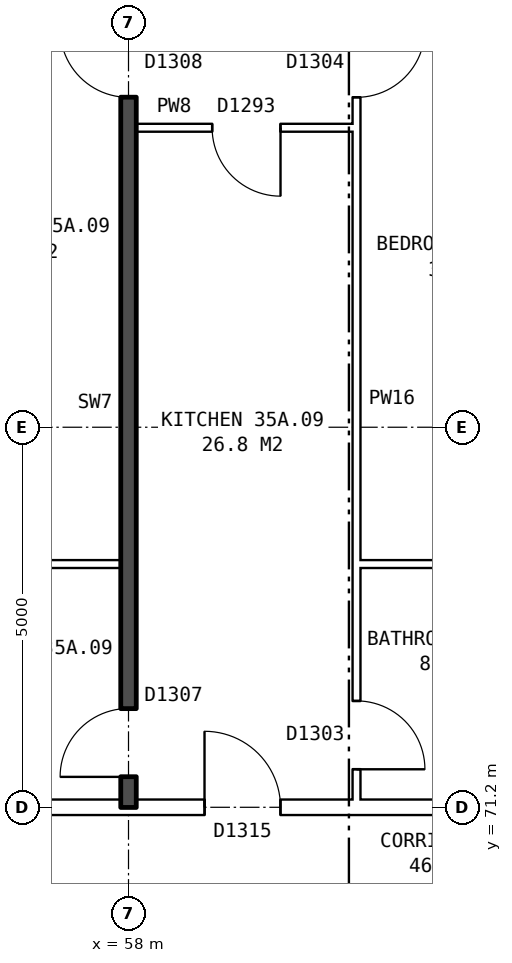
"""IFC4 building model, lengths in metres.
Left out: names, types, materials, properties, quantities, classifications, styles, units other than length and angle.
Written with IfcOpenShell. Run it as: python <this file> out.ifc"""

import sys

from ifc_helpers import new_model, si_unit, direction, frame, frame_2d, origin, place, context, subcontext, project, spatial, rectangle, extrude, element, fill, save


model = new_model("IFC4")
c1 = context("Model", 3, precision=1e-05, world=origin(), true_north=direction((0.0, 1.0)))
c2 = subcontext(c1, "Body", "Model", "MODEL_VIEW")
j1 = project(units=[si_unit("LENGTHUNIT", "METRE"), si_unit("PLANEANGLEUNIT", "RADIAN")], contexts=[c1])
p1 = place(None, origin())
s1 = spatial("IfcSite", under=j1, at=p1, CompositionType="ELEMENT")
p2 = place(p1, origin())
s2 = spatial("IfcBuilding", under=s1, at=p2, CompositionType="ELEMENT")
p3 = place(p2, frame((0.0, 0.0, 126.8)))
s3 = spatial("IfcBuildingStorey", under=s2, at=p3, CompositionType="ELEMENT", Elevation=126.8)
p4 = place(p3, frame((44.36, 71.2, 0.0), z_axis=(0.0, 0.0, 1.0), x_axis=(1.0, 0.0, 0.0)))
e1 = element("IfcWall", 1, at=p4, inside=s3, PredefinedType="PARTITIONING", context=c2, shape_type="SweptSolid", body=[
    extrude(rectangle(XDim=19.28, YDim=0.2, at=frame_2d((9.64, 0.0))), origin(), (0.0, 0.0, 1.0), 2.85),
])
p5 = place(p4, frame((14.64, 0.0, 0.0)))
e2 = element("IfcOpeningElement", 2, at=p5, cuts=e1, PredefinedType="OPENING", context=c2, shape_type="SweptSolid", body=[
    extrude(rectangle(XDim=1.0, YDim=2.1, at=frame_2d((0.5, 1.05))), frame((0.0, 0.11, 0.0), z_axis=(0.0, -1.0, 0.0), x_axis=(1.0, 0.0, 0.0)), (0.0, 0.0, 1.0), 0.22),
])
p6 = place(p4, frame((5.64, 0.0, 0.0)))
e3 = element("IfcOpeningElement", 3, at=p6, cuts=e1, PredefinedType="OPENING", context=c2, shape_type="SweptSolid", body=[
    extrude(rectangle(XDim=1.0, YDim=2.1, at=frame_2d((0.5, 1.05))), frame((0.0, 0.11, 0.0), z_axis=(0.0, -1.0, 0.0), x_axis=(1.0, 0.0, 0.0)), (0.0, 0.0, 1.0), 0.22),
])
p7 = place(p3, frame((55.1, 74.4, 0.0), z_axis=(0.0, 0.0, 1.0), x_axis=(1.0, 0.0, 0.0)))
e4 = element("IfcWall", 4, at=p7, inside=s3, PredefinedType="PARTITIONING", context=c2, shape_type="SweptSolid", body=[
    extrude(rectangle(XDim=2.8, YDim=0.1, at=frame_2d((1.4, 0.0))), origin(), (0.0, 0.0, 1.0), 2.85),
])
p8 = place(p3, frame((61.0, 74.4, 0.0), z_axis=(0.0, 0.0, 1.0), x_axis=(1.0, 0.0, 0.0)))
e5 = element("IfcWall", 5, at=p8, inside=s3, PredefinedType="PARTITIONING", context=c2, shape_type="SweptSolid", body=[
    extrude(rectangle(XDim=2.64, YDim=0.1, at=frame_2d((1.32, 0.0))), origin(), (0.0, 0.0, 1.0), 2.85),
])
p9 = place(p3, frame((58.1, 80.14, 0.0), z_axis=(0.0, 0.0, 1.0), x_axis=(1.0, 0.0, 0.0)))
e6 = element("IfcWall", 6, at=p9, inside=s3, PredefinedType="PARTITIONING", context=c2, shape_type="SweptSolid", body=[
    extrude(rectangle(XDim=2.9, YDim=0.1, at=frame_2d((1.45, 0.0))), origin(), (0.0, 0.0, 1.0), 2.85),
])
p10 = place(p9, frame((1.0, 0.0, 0.0)))
e7 = element("IfcOpeningElement", 7, at=p10, cuts=e6, PredefinedType="OPENING", context=c2, shape_type="SweptSolid", body=[
    extrude(rectangle(XDim=0.9, YDim=2.1, at=frame_2d((0.45, 1.05))), frame((0.0, 0.06, 0.0), z_axis=(0.0, -1.0, 0.0), x_axis=(1.0, 0.0, 0.0)), (0.0, 0.0, 1.0), 0.12),
])
p11 = place(p3, frame((58.0, 71.2, 0.0), z_axis=(0.0, 0.0, 1.0), x_axis=(0.0, 1.0, 0.0)))
e8 = element("IfcWall", 8, at=p11, inside=s3, PredefinedType="SOLIDWALL", context=c2, shape_type="SweptSolid", body=[
    extrude(rectangle(XDim=14.44, YDim=0.2, at=frame_2d((7.22, 0.0))), origin(), (0.0, 0.0, 1.0), 2.85),
])
p12 = place(p11, frame((9.34, 0.0, 0.0)))
e9 = element("IfcOpeningElement", 9, at=p12, cuts=e8, PredefinedType="OPENING", context=c2, shape_type="SweptSolid", body=[
    extrude(rectangle(XDim=0.9, YDim=2.1, at=frame_2d((0.45, 1.05))), frame((0.0, 0.11, 0.0), z_axis=(0.0, -1.0, 0.0), x_axis=(1.0, 0.0, 0.0)), (0.0, 0.0, 1.0), 0.22),
])
p13 = place(p11, frame((0.4, 0.0, 0.0)))
e10 = element("IfcOpeningElement", 10, at=p13, cuts=e8, PredefinedType="OPENING", context=c2, shape_type="SweptSolid", body=[
    extrude(rectangle(XDim=0.9, YDim=2.1, at=frame_2d((0.45, 1.05))), frame((0.0, 0.11, 0.0), z_axis=(0.0, -1.0, 0.0), x_axis=(1.0, 0.0, 0.0)), (0.0, 0.0, 1.0), 0.22),
])
p14 = place(p3, frame((61.0, 71.3, 0.0), z_axis=(0.0, 0.0, 1.0), x_axis=(0.0, 1.0, 0.0)))
e11 = element("IfcWall", 11, at=p14, inside=s3, PredefinedType="PARTITIONING", context=c2, shape_type="SweptSolid", body=[
    extrude(rectangle(XDim=14.34, YDim=0.1, at=frame_2d((7.17, 0.0))), origin(), (0.0, 0.0, 1.0), 2.85),
])
p15 = place(p14, frame((9.24, 0.0, 0.0)))
e12 = element("IfcOpeningElement", 12, at=p15, cuts=e11, PredefinedType="OPENING", context=c2, shape_type="SweptSolid", body=[
    extrude(rectangle(XDim=0.9, YDim=2.1, at=frame_2d((0.45, 1.05))), frame((0.0, 0.06, 0.0), z_axis=(0.0, -1.0, 0.0), x_axis=(1.0, 0.0, 0.0)), (0.0, 0.0, 1.0), 0.12),
])
p16 = place(p14, frame((0.4, 0.0, 0.0)))
e13 = element("IfcOpeningElement", 13, at=p16, cuts=e11, PredefinedType="OPENING", context=c2, shape_type="SweptSolid", body=[
    extrude(rectangle(XDim=0.9, YDim=2.1, at=frame_2d((0.45, 1.05))), frame((0.0, 0.06, 0.0), z_axis=(0.0, -1.0, 0.0), x_axis=(1.0, 0.0, 0.0)), (0.0, 0.0, 1.0), 0.12),
])
p17 = place(p15, frame((0.9, 0.0, 0.0), z_axis=(0.0, 0.0, 1.0), x_axis=(-1.0, 0.0, 0.0)))
e14 = element("IfcDoor", 14, at=p17, inside=s3, OperationType="SINGLE_SWING_LEFT", PredefinedType="DOOR", context=c2, shape_type="SweptSolid", body=[
    extrude(rectangle(XDim=0.9, YDim=2.1, at=frame_2d((0.45, 1.05))), frame((0.0, 0.025, 0.0), z_axis=(0.0, -1.0, 0.0), x_axis=(1.0, 0.0, 0.0)), (0.0, 0.0, 1.0), 0.05),
])
fill(e12, e14)
p18 = place(p12, origin())
e15 = element("IfcDoor", 15, at=p18, inside=s3, OperationType="SINGLE_SWING_RIGHT", PredefinedType="DOOR", context=c2, shape_type="SweptSolid", body=[
    extrude(rectangle(XDim=0.9, YDim=2.1, at=frame_2d((0.45, 1.05))), frame((0.0, 0.025, 0.0), z_axis=(0.0, -1.0, 0.0), x_axis=(1.0, 0.0, 0.0)), (0.0, 0.0, 1.0), 0.05),
])
fill(e9, e15)
p19 = place(p5, origin())
e16 = element("IfcDoor", 16, at=p19, inside=s3, OperationType="SINGLE_SWING_LEFT", PredefinedType="DOOR", context=c2, shape_type="SweptSolid", body=[
    extrude(rectangle(XDim=1.0, YDim=2.1, at=frame_2d((0.5, 1.05))), frame((0.0, 0.025, 0.0), z_axis=(0.0, -1.0, 0.0), x_axis=(1.0, 0.0, 0.0)), (0.0, 0.0, 1.0), 0.05),
])
fill(e2, e16)
p20 = place(p10, frame((0.9, 0.0, 0.0), z_axis=(0.0, 0.0, 1.0), x_axis=(-1.0, 0.0, 0.0)))
e17 = element("IfcDoor", 17, at=p20, inside=s3, OperationType="SINGLE_SWING_LEFT", PredefinedType="DOOR", context=c2, shape_type="SweptSolid", body=[
    extrude(rectangle(XDim=0.9, YDim=2.1, at=frame_2d((0.45, 1.05))), frame((0.0, 0.025, 0.0), z_axis=(0.0, -1.0, 0.0), x_axis=(1.0, 0.0, 0.0)), (0.0, 0.0, 1.0), 0.05),
])
fill(e7, e17)
p21 = place(p16, frame((0.9, 0.0, 0.0), z_axis=(0.0, 0.0, 1.0), x_axis=(-1.0, 0.0, 0.0)))
e18 = element("IfcDoor", 18, at=p21, inside=s3, OperationType="SINGLE_SWING_RIGHT", PredefinedType="DOOR", context=c2, shape_type="SweptSolid", body=[
    extrude(rectangle(XDim=0.9, YDim=2.1, at=frame_2d((0.45, 1.05))), frame((0.0, 0.025, 0.0), z_axis=(0.0, -1.0, 0.0), x_axis=(1.0, 0.0, 0.0)), (0.0, 0.0, 1.0), 0.05),
])
fill(e13, e18)
p22 = place(p13, origin())
e19 = element("IfcDoor", 19, at=p22, inside=s3, OperationType="SINGLE_SWING_LEFT", PredefinedType="DOOR", context=c2, shape_type="SweptSolid", body=[
    extrude(rectangle(XDim=0.9, YDim=2.1, at=frame_2d((0.45, 1.05))), frame((0.0, 0.025, 0.0), z_axis=(0.0, -1.0, 0.0), x_axis=(1.0, 0.0, 0.0)), (0.0, 0.0, 1.0), 0.05),
])
fill(e10, e19)
save(model, sys.argv[1])
